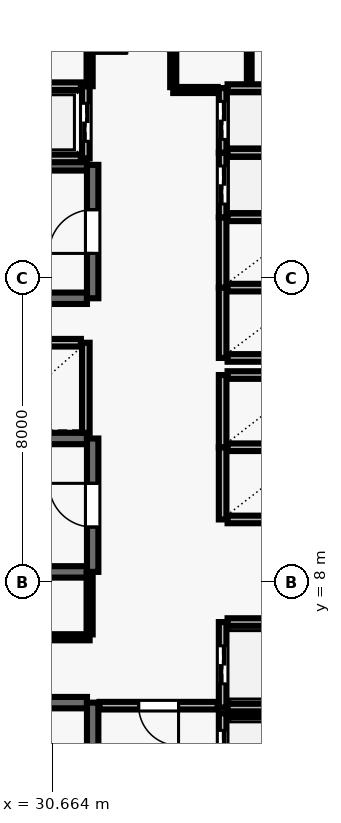
"""IFC4 building model, lengths in metres.
Left out: names, types, materials, properties, quantities, classifications, styles, units other than length and angle.
Written with IfcOpenShell. Run it as: python <this file> out.ifc"""

import sys

from ifc_helpers import new_model, si_unit, direction, frame, frame_2d, origin, place, context, subcontext, project, spatial, rectangle, extrude, element, fill, save


model = new_model("IFC4")
c1 = context("Model", 3, precision=1e-05, world=origin(), true_north=direction((0.0, 1.0)))
c2 = subcontext(c1, "Body", "Model", "MODEL_VIEW")
j1 = project(units=[si_unit("LENGTHUNIT", "METRE"), si_unit("PLANEANGLEUNIT", "RADIAN")], contexts=[c1])
p1 = place(None, origin())
s1 = spatial("IfcSite", under=j1, at=p1, CompositionType="ELEMENT")
p2 = place(p1, origin())
s2 = spatial("IfcBuilding", under=s1, at=p2, CompositionType="ELEMENT")
p3 = place(p2, frame((0.0, 0.0, 161.9)))
s3 = spatial("IfcBuildingStorey", under=s2, at=p3, CompositionType="ELEMENT", Elevation=161.9)
p4 = place(p3, frame((31.58, 4.83, 0.0), z_axis=(0.0, 0.0, 1.0), x_axis=(-1.0, 0.0, 0.0)))
e1 = element("IfcWall", 1, at=p4, inside=s3, PredefinedType="SHEAR", context=c2, shape_type="SweptSolid", body=[
    extrude(rectangle(XDim=8.36, YDim=0.3, at=frame_2d((4.18, 0.0))), origin(), (0.0, 0.0, 1.0), 3.64),
])
p5 = place(p3, frame((31.73, 0.96, 0.0), z_axis=(0.0, 0.0, 1.0), x_axis=(0.0, 1.0, 0.0)))
e2 = element("IfcWall", 2, at=p5, inside=s3, PredefinedType="SHEAR", context=c2, shape_type="SweptSolid", body=[
    extrude(rectangle(XDim=3.87, YDim=0.3, at=frame_2d((1.935, 0.0))), origin(), (0.0, 0.0, 1.0), 3.64),
])
p6 = place(p5, frame((1.54, 0.0, 0.0)))
e3 = element("IfcOpeningElement", 3, at=p6, cuts=e2, PredefinedType="OPENING", context=c2, shape_type="SweptSolid", body=[
    extrude(rectangle(XDim=1.15, YDim=2.15, at=frame_2d((0.575, 1.075))), frame((0.0, 0.16, 0.0), z_axis=(0.0, -1.0, 0.0), x_axis=(1.0, 0.0, 0.0)), (0.0, 0.0, 1.0), 0.32),
])
for number, where, z_axis, x_axis in (
    (4, (31.58, 18.98, 0.0), (0.0, 0.0, 1.0), (-1.0, 0.0, 0.0)),
    (5, (23.22, 15.47, 0.0), (0.0, 0.0, 1.0), (1.0, 0.0, 0.0)),
):
    element("IfcWall", number, at=place(p3, frame(where, z_axis=z_axis, x_axis=x_axis)), inside=s3, PredefinedType="SHEAR", context=c2, shape_type="SweptSolid", body=[
        extrude(rectangle(XDim=8.36, YDim=0.3, at=frame_2d((4.18, 0.0))), origin(), (0.0, 0.0, 1.0), 3.64),
    ])
p7 = place(p3, frame((31.73, 15.47, 0.0), z_axis=(0.0, 0.0, 1.0), x_axis=(0.0, 1.0, 0.0)))
e6 = element("IfcWall", 6, at=p7, inside=s3, PredefinedType="SHEAR", context=c2, shape_type="SweptSolid", body=[
    extrude(rectangle(XDim=3.51, YDim=0.3, at=frame_2d((1.755, 0.0))), origin(), (0.0, 0.0, 1.0), 3.64),
])
p8 = place(p7, frame((1.18, 0.0, 0.0)))
e7 = element("IfcOpeningElement", 7, at=p8, cuts=e6, PredefinedType="OPENING", context=c2, shape_type="SweptSolid", body=[
    extrude(rectangle(XDim=1.15, YDim=2.15, at=frame_2d((0.575, 1.075))), frame((0.0, 0.16, 0.0), z_axis=(0.0, -1.0, 0.0), x_axis=(1.0, 0.0, 0.0)), (0.0, 0.0, 1.0), 0.32),
])
for number, where, z_axis, x_axis in (
    (8, (31.58, 11.78, 0.0), (0.0, 0.0, 1.0), (-1.0, 0.0, 0.0)),
    (9, (23.22, 8.27, 0.0), (0.0, 0.0, 1.0), (1.0, 0.0, 0.0)),
):
    element("IfcWall", number, at=place(p3, frame(where, z_axis=z_axis, x_axis=x_axis)), inside=s3, PredefinedType="SHEAR", context=c2, shape_type="SweptSolid", body=[
        extrude(rectangle(XDim=8.36, YDim=0.3, at=frame_2d((4.18, 0.0))), origin(), (0.0, 0.0, 1.0), 3.64),
    ])
p9 = place(p3, frame((31.73, 8.27, 0.0), z_axis=(0.0, 0.0, 1.0), x_axis=(0.0, 1.0, 0.0)))
e10 = element("IfcWall", 10, at=p9, inside=s3, PredefinedType="SHEAR", context=c2, shape_type="SweptSolid", body=[
    extrude(rectangle(XDim=3.51, YDim=0.3, at=frame_2d((1.755, 0.0))), origin(), (0.0, 0.0, 1.0), 3.64),
])
p10 = place(p9, frame((1.18, 0.0, 0.0)))
e11 = element("IfcOpeningElement", 11, at=p10, cuts=e10, PredefinedType="OPENING", context=c2, shape_type="SweptSolid", body=[
    extrude(rectangle(XDim=1.15, YDim=2.15, at=frame_2d((0.575, 1.075))), frame((0.0, 0.16, 0.0), z_axis=(0.0, -1.0, 0.0), x_axis=(1.0, 0.0, 0.0)), (0.0, 0.0, 1.0), 0.32),
])
p11 = place(p3, frame((35.15, 4.55, 0.0), z_axis=(0.0, 0.0, 1.0), x_axis=(0.0, -1.0, 0.0)))
e12 = element("IfcWall", 12, at=p11, inside=s3, PredefinedType="SOLIDWALL", context=c2, shape_type="SweptSolid", body=[
    extrude(rectangle(XDim=2.1, YDim=0.2, at=frame_2d((1.05, 0.0))), origin(), (0.0, 0.0, 1.0), 3.64),
])
p12 = place(p11, frame((0.45, 0.0, 0.0)))
e13 = element("IfcOpeningElement", 13, at=p12, cuts=e12, PredefinedType="OPENING", context=c2, shape_type="SweptSolid", body=[
    extrude(rectangle(XDim=1.2, YDim=2.15, at=frame_2d((0.6, 1.075))), frame((0.0, 0.11, 0.0), z_axis=(0.0, -1.0, 0.0), x_axis=(1.0, 0.0, 0.0)), (0.0, 0.0, 1.0), 0.22),
])
p13 = place(p3, frame((37.42, 4.55, 0.0), z_axis=(0.0, 0.0, 1.0), x_axis=(-1.0, 0.0, 0.0)))
e14 = element("IfcWall", 14, at=p13, inside=s3, PredefinedType="SOLIDWALL", context=c2, shape_type="SweptSolid", body=[
    extrude(rectangle(XDim=2.14, YDim=0.2, at=frame_2d((1.07, 0.0))), origin(), (0.0, 0.0, 1.0), 3.64),
])
p14 = place(p3, frame((35.15, 6.95, 0.0), z_axis=(0.0, 0.0, 1.0), x_axis=(0.0, -1.0, 0.0)))
e15 = element("IfcWall", 15, at=p14, inside=s3, PredefinedType="SOLIDWALL", context=c2, shape_type="SweptSolid", body=[
    extrude(rectangle(XDim=2.25, YDim=0.2, at=frame_2d((1.125, 0.0))), origin(), (0.0, 0.0, 1.0), 3.64),
])
p15 = place(p14, frame((0.625, 0.0, 0.0)))
e16 = element("IfcOpeningElement", 16, at=p15, cuts=e15, PredefinedType="OPENING", context=c2, shape_type="SweptSolid", body=[
    extrude(rectangle(XDim=1.0, YDim=2.1, at=frame_2d((0.5, 1.05))), frame((0.0, 0.11, 0.0), z_axis=(0.0, -1.0, 0.0), x_axis=(1.0, 0.0, 0.0)), (0.0, 0.0, 1.0), 0.22),
])
for number, where, z_axis, x_axis in (
    (17, (35.28, 4.7, 0.0), (0.0, 0.0, 1.0), (1.0, 0.0, 0.0)),
    (18, (37.42, 6.95, 0.0), (0.0, 0.0, 1.0), (-1.0, 0.0, 0.0)),
):
    element("IfcWall", number, at=place(p3, frame(where, z_axis=z_axis, x_axis=x_axis)), inside=s3, PredefinedType="SOLIDWALL", context=c2, shape_type="SweptSolid", body=[
        extrude(rectangle(XDim=2.14, YDim=0.2, at=frame_2d((1.07, 0.0))), origin(), (0.0, 0.0, 1.0), 3.64),
    ])
p16 = place(p3, frame((35.15, 11.55, 0.0), z_axis=(0.0, 0.0, 1.0), x_axis=(0.0, -1.0, 0.0)))
e19 = element("IfcWall", 19, at=p16, inside=s3, PredefinedType="SOLIDWALL", context=c2, shape_type="SweptSolid", body=[
    extrude(rectangle(XDim=1.9, YDim=0.2, at=frame_2d((0.95, 0.0))), origin(), (0.0, 0.0, 1.0), 3.64),
])
for number, where, z_axis, x_axis in (
    (20, (35.28, 9.65, 0.0), (0.0, 0.0, 1.0), (1.0, 0.0, 0.0)),
    (21, (37.42, 11.55, 0.0), (0.0, 0.0, 1.0), (-1.0, 0.0, 0.0)),
):
    element("IfcWall", number, at=place(p3, frame(where, z_axis=z_axis, x_axis=x_axis)), inside=s3, PredefinedType="SOLIDWALL", context=c2, shape_type="SweptSolid", body=[
        extrude(rectangle(XDim=2.14, YDim=0.2, at=frame_2d((1.07, 0.0))), origin(), (0.0, 0.0, 1.0), 3.64),
    ])
p17 = place(p3, frame((35.15, 13.45, 0.0), z_axis=(0.0, 0.0, 1.0), x_axis=(0.0, -1.0, 0.0)))
e22 = element("IfcWall", 22, at=p17, inside=s3, PredefinedType="SOLIDWALL", context=c2, shape_type="SweptSolid", body=[
    extrude(rectangle(XDim=1.9, YDim=0.2, at=frame_2d((0.95, 0.0))), origin(), (0.0, 0.0, 1.0), 3.64),
])
p18 = place(p3, frame((37.42, 13.45, 0.0), z_axis=(0.0, 0.0, 1.0), x_axis=(-1.0, 0.0, 0.0)))
e23 = element("IfcWall", 23, at=p18, inside=s3, PredefinedType="SOLIDWALL", context=c2, shape_type="SweptSolid", body=[
    extrude(rectangle(XDim=2.14, YDim=0.2, at=frame_2d((1.07, 0.0))), origin(), (0.0, 0.0, 1.0), 3.64),
])
p19 = place(p3, frame((31.55, 11.93, 0.0), z_axis=(0.0, 0.0, 1.0), x_axis=(0.0, 1.0, 0.0)))
e24 = element("IfcWall", 24, at=p19, inside=s3, PredefinedType="SOLIDWALL", context=c2, shape_type="SweptSolid", body=[
    extrude(rectangle(XDim=2.37, YDim=0.2, at=frame_2d((1.185, 0.0))), origin(), (0.0, 0.0, 1.0), 3.64),
])
p20 = place(p3, frame((31.42, 14.3, 0.0), z_axis=(0.0, 0.0, 1.0), x_axis=(-1.0, 0.0, 0.0)))
e25 = element("IfcWall", 25, at=p20, inside=s3, PredefinedType="SOLIDWALL", context=c2, shape_type="SweptSolid", body=[
    extrude(rectangle(XDim=2.44, YDim=0.2, at=frame_2d((1.22, 0.0))), origin(), (0.0, 0.0, 1.0), 3.64),
])
p21 = place(p3, frame((35.15, 15.75, 0.0), z_axis=(0.0, 0.0, 1.0), x_axis=(0.0, -1.0, 0.0)))
e26 = element("IfcWall", 26, at=p21, inside=s3, PredefinedType="SOLIDWALL", context=c2, shape_type="SweptSolid", body=[
    extrude(rectangle(XDim=1.85, YDim=0.2, at=frame_2d((0.925, 0.0))), origin(), (0.0, 0.0, 1.0), 3.64),
])
for number, where, z_axis, x_axis in (
    (27, (35.28, 13.9, 0.0), (0.0, 0.0, 1.0), (1.0, 0.0, 0.0)),
    (28, (37.42, 15.75, 0.0), (0.0, 0.0, 1.0), (-1.0, 0.0, 0.0)),
):
    element("IfcWall", number, at=place(p3, frame(where, z_axis=z_axis, x_axis=x_axis)), inside=s3, PredefinedType="SOLIDWALL", context=c2, shape_type="SweptSolid", body=[
        extrude(rectangle(XDim=2.14, YDim=0.2, at=frame_2d((1.07, 0.0))), origin(), (0.0, 0.0, 1.0), 3.64),
    ])
p22 = place(p3, frame((35.15, 17.6, 0.0), z_axis=(0.0, 0.0, 1.0), x_axis=(0.0, -1.0, 0.0)))
e29 = element("IfcWall", 29, at=p22, inside=s3, PredefinedType="SOLIDWALL", context=c2, shape_type="SweptSolid", body=[
    extrude(rectangle(XDim=1.85, YDim=0.2, at=frame_2d((0.925, 0.0))), origin(), (0.0, 0.0, 1.0), 3.64),
])
p23 = place(p3, frame((37.42, 17.6, 0.0), z_axis=(0.0, 0.0, 1.0), x_axis=(-1.0, 0.0, 0.0)))
e30 = element("IfcWall", 30, at=p23, inside=s3, PredefinedType="SOLIDWALL", context=c2, shape_type="SweptSolid", body=[
    extrude(rectangle(XDim=2.14, YDim=0.2, at=frame_2d((1.07, 0.0))), origin(), (0.0, 0.0, 1.0), 3.64),
])
p24 = place(p3, frame((35.15, 19.3, 0.0), z_axis=(0.0, 0.0, 1.0), x_axis=(0.0, -1.0, 0.0)))
e31 = element("IfcWall", 31, at=p24, inside=s3, PredefinedType="SOLIDWALL", context=c2, shape_type="SweptSolid", body=[
    extrude(rectangle(XDim=1.7, YDim=0.2, at=frame_2d((0.85, 0.0))), origin(), (0.0, 0.0, 1.0), 3.64),
])
p25 = place(p24, frame((0.35, 0.0, 0.0)))
e32 = element("IfcOpeningElement", 32, at=p25, cuts=e31, PredefinedType="OPENING", context=c2, shape_type="SweptSolid", body=[
    extrude(rectangle(XDim=1.0, YDim=2.1, at=frame_2d((0.5, 1.05))), frame((0.0, 0.11, 0.0), z_axis=(0.0, -1.0, 0.0), x_axis=(1.0, 0.0, 0.0)), (0.0, 0.0, 1.0), 0.22),
])
p26 = place(p3, frame((37.42, 19.3, 0.0), z_axis=(0.0, 0.0, 1.0), x_axis=(-1.0, 0.0, 0.0)))
e33 = element("IfcWall", 33, at=p26, inside=s3, PredefinedType="SOLIDWALL", context=c2, shape_type="SweptSolid", body=[
    extrude(rectangle(XDim=2.14, YDim=0.2, at=frame_2d((1.07, 0.0))), origin(), (0.0, 0.0, 1.0), 3.64),
])
p27 = place(p3, frame((35.15, 21.0, 0.0), z_axis=(0.0, 0.0, 1.0), x_axis=(0.0, -1.0, 0.0)))
e34 = element("IfcWall", 34, at=p27, inside=s3, PredefinedType="SOLIDWALL", context=c2, shape_type="SweptSolid", body=[
    extrude(rectangle(XDim=1.7, YDim=0.2, at=frame_2d((0.85, 0.0))), origin(), (0.0, 0.0, 1.0), 3.64),
])
p28 = place(p27, frame((0.35, 0.0, 0.0)))
e35 = element("IfcOpeningElement", 35, at=p28, cuts=e34, PredefinedType="OPENING", context=c2, shape_type="SweptSolid", body=[
    extrude(rectangle(XDim=1.0, YDim=2.1, at=frame_2d((0.5, 1.05))), frame((0.0, 0.11, 0.0), z_axis=(0.0, -1.0, 0.0), x_axis=(1.0, 0.0, 0.0)), (0.0, 0.0, 1.0), 0.22),
])
p29 = place(p3, frame((37.42, 21.0, 0.0), z_axis=(0.0, 0.0, 1.0), x_axis=(-1.0, 0.0, 0.0)))
e36 = element("IfcWall", 36, at=p29, inside=s3, PredefinedType="SOLIDWALL", context=c2, shape_type="SweptSolid", body=[
    extrude(rectangle(XDim=2.14, YDim=0.2, at=frame_2d((1.07, 0.0))), origin(), (0.0, 0.0, 1.0), 3.64),
])
p30 = place(p3, frame((31.55, 19.15, 0.0), z_axis=(0.0, 0.0, 1.0), x_axis=(0.0, 1.0, 0.0)))
e37 = element("IfcWall", 37, at=p30, inside=s3, PredefinedType="SOLIDWALL", context=c2, shape_type="SweptSolid", body=[
    extrude(rectangle(XDim=1.9, YDim=0.2, at=frame_2d((0.95, 0.0))), origin(), (0.0, 0.0, 1.0), 3.64),
])
p31 = place(p30, frame((0.45, 0.0, 0.0)))
e38 = element("IfcOpeningElement", 38, at=p31, cuts=e37, PredefinedType="OPENING", context=c2, shape_type="SweptSolid", body=[
    extrude(rectangle(XDim=1.0, YDim=2.1, at=frame_2d((0.5, 1.05))), frame((0.0, 0.11, 0.0), z_axis=(0.0, -1.0, 0.0), x_axis=(1.0, 0.0, 0.0)), (0.0, 0.0, 1.0), 0.22),
])
for number, where, z_axis, x_axis in (
    (39, (28.98, 19.15, 0.0), (0.0, 0.0, 1.0), (1.0, 0.0, 0.0)),
    (40, (31.42, 21.05, 0.0), (0.0, 0.0, 1.0), (-1.0, 0.0, 0.0)),
):
    element("IfcWall", number, at=place(p3, frame(where, z_axis=z_axis, x_axis=x_axis)), inside=s3, PredefinedType="SOLIDWALL", context=c2, shape_type="SweptSolid", body=[
        extrude(rectangle(XDim=2.44, YDim=0.2, at=frame_2d((1.22, 0.0))), origin(), (0.0, 0.0, 1.0), 3.64),
    ])
p32 = place(p3, frame((31.65, 6.55, 0.0), z_axis=(0.0, 0.0, 1.0), x_axis=(-1.0, 0.0, 0.0)))
e41 = element("IfcWall", 41, at=p32, inside=s3, PredefinedType="PARTITIONING", context=c2, shape_type="SweptSolid", body=[
    extrude(rectangle(XDim=4.75, YDim=0.16, at=frame_2d((2.375, 0.0))), origin(), (0.0, 0.0, 1.0), 3.64),
])
p33 = place(p32, frame((1.935, 0.0, 0.0)))
e42 = element("IfcOpeningElement", 42, at=p33, cuts=e41, PredefinedType="OPENING", context=c2, shape_type="SweptSolid", body=[
    extrude(rectangle(XDim=0.88, YDim=2.1, at=frame_2d((0.44, 1.05))), frame((0.0, 0.09, 0.0), z_axis=(0.0, -1.0, 0.0), x_axis=(1.0, 0.0, 0.0)), (0.0, 0.0, 1.0), 0.18),
])
p34 = place(p3, frame((35.02, 4.75, 0.0), z_axis=(0.0, 0.0, 1.0), x_axis=(-1.0, 0.0, 0.0)))
e43 = element("IfcWall", 43, at=p34, inside=s3, PredefinedType="SOLIDWALL", context=c2, shape_type="SweptSolid", body=[
    extrude(rectangle(XDim=3.11, YDim=0.2, at=frame_2d((1.555, 0.0))), origin(), (0.0, 0.0, 1.0), 3.64),
])
p35 = place(p34, frame((1.03, 0.0, 0.0)))
e44 = element("IfcOpeningElement", 44, at=p35, cuts=e43, PredefinedType="OPENING", context=c2, shape_type="SweptSolid", body=[
    extrude(rectangle(XDim=1.05, YDim=2.15, at=frame_2d((0.525, 1.075))), frame((0.0, 0.11, 0.0), z_axis=(0.0, -1.0, 0.0), x_axis=(1.0, 0.0, 0.0)), (0.0, 0.0, 1.0), 0.22),
])
p36 = place(p3, frame((35.02, 20.95, 0.0), z_axis=(0.0, 0.0, 1.0), x_axis=(-1.0, 0.0, 0.0)))
e45 = element("IfcWall", 45, at=p36, inside=s3, PredefinedType="PARTITIONING", context=c2, shape_type="SweptSolid", body=[
    extrude(rectangle(XDim=1.17, YDim=0.16, at=frame_2d((0.585, 0.0))), origin(), (0.0, 0.0, 1.0), 3.64),
])
p37 = place(p3, frame((31.65, 8.24, 0.0), z_axis=(0.0, 0.0, 1.0), x_axis=(0.0, -1.0, 0.0)))
e46 = element("IfcWall", 46, at=p37, inside=s3, PredefinedType="PARTITIONING", context=c2, shape_type="SweptSolid", body=[
    extrude(rectangle(XDim=1.615, YDim=0.16, at=frame_2d((0.808, 0.0))), origin(), (0.0, 0.0, 1.0), 3.64),
])
p38 = place(p3, frame((31.65, 23.775, 0.0), z_axis=(0.0, 0.0, 1.0), x_axis=(0.0, -1.0, 0.0)))
e47 = element("IfcWall", 47, at=p38, inside=s3, PredefinedType="PARTITIONING", context=c2, shape_type="SweptSolid", body=[
    extrude(rectangle(XDim=2.725, YDim=0.16, at=frame_2d((1.362, 0.0))), origin(), (0.0, 0.0, 1.0), 3.64),
])
p39 = place(p38, frame((0.862, 0.0, 0.0)))
e48 = element("IfcOpeningElement", 48, at=p39, cuts=e47, PredefinedType="OPENING", context=c2, shape_type="SweptSolid", body=[
    extrude(rectangle(XDim=1.0, YDim=2.1, at=frame_2d((0.5, 1.05))), frame((0.0, 0.09, 0.0), z_axis=(0.0, -1.0, 0.0), x_axis=(1.0, 0.0, 0.0)), (0.0, 0.0, 1.0), 0.18),
])
p40 = place(p3, frame((33.85, 21.025, 0.0), z_axis=(0.0, 0.0, 1.0), x_axis=(0.0, 1.0, 0.0)))
e49 = element("IfcWall", 49, at=p40, inside=s3, PredefinedType="PARTITIONING", context=c2, shape_type="SweptSolid", body=[
    extrude(rectangle(XDim=2.75, YDim=0.16, at=frame_2d((1.375, 0.0))), origin(), (0.0, 0.0, 1.0), 3.64),
])
p41 = place(p40, frame((0.925, 0.0, 0.0)))
e50 = element("IfcOpeningElement", 50, at=p41, cuts=e49, PredefinedType="OPENING", context=c2, shape_type="SweptSolid", body=[
    extrude(rectangle(XDim=0.9, YDim=2.1, at=frame_2d((0.45, 1.05))), frame((0.0, 0.09, 0.0), z_axis=(0.0, -1.0, 0.0), x_axis=(1.0, 0.0, 0.0)), (0.0, 0.0, 1.0), 0.18),
])
p42 = place(p3, frame((35.85, 21.13, 0.0), z_axis=(0.0, 0.0, 1.0), x_axis=(0.0, 1.0, 0.0)))
e51 = element("IfcWall", 51, at=p42, inside=s3, PredefinedType="PARTITIONING", context=c2, shape_type="SweptSolid", body=[
    extrude(rectangle(XDim=2.645, YDim=0.125, at=frame_2d((1.323, 0.0))), origin(), (0.0, 0.0, 1.0), 3.64),
])
p43 = place(p42, frame((0.872, 0.0, 0.0)))
e52 = element("IfcOpeningElement", 52, at=p43, cuts=e51, PredefinedType="OPENING", context=c2, shape_type="SweptSolid", body=[
    extrude(rectangle(XDim=0.9, YDim=2.1, at=frame_2d((0.45, 1.05))), frame((0.0, 0.073, 0.0), z_axis=(0.0, -1.0, 0.0), x_axis=(1.0, 0.0, 0.0)), (0.0, 0.0, 1.0), 0.145),
])
p44 = place(p8, origin())
e53 = element("IfcDoor", 53, at=p44, inside=s3, OperationType="SINGLE_SWING_LEFT", PredefinedType="DOOR", context=c2, shape_type="SweptSolid", body=[
    extrude(rectangle(XDim=1.15, YDim=2.15, at=frame_2d((0.575, 1.075))), frame((0.0, 0.025, 0.0), z_axis=(0.0, -1.0, 0.0), x_axis=(1.0, 0.0, 0.0)), (0.0, 0.0, 1.0), 0.05),
])
fill(e7, e53)
p45 = place(p10, origin())
e54 = element("IfcDoor", 54, at=p45, inside=s3, OperationType="SINGLE_SWING_RIGHT", PredefinedType="DOOR", context=c2, shape_type="SweptSolid", body=[
    extrude(rectangle(XDim=1.15, YDim=2.15, at=frame_2d((0.575, 1.075))), frame((0.0, 0.025, 0.0), z_axis=(0.0, -1.0, 0.0), x_axis=(1.0, 0.0, 0.0)), (0.0, 0.0, 1.0), 0.05),
])
fill(e11, e54)
p46 = place(p12, origin())
e55 = element("IfcDoor", 55, at=p46, inside=s3, OperationType="DOUBLE_DOOR_SLIDING", PredefinedType="DOOR", context=c2, shape_type="SweptSolid", body=[
    extrude(rectangle(XDim=1.2, YDim=2.15, at=frame_2d((0.6, 1.075))), frame((0.0, 0.025, 0.0), z_axis=(0.0, -1.0, 0.0), x_axis=(1.0, 0.0, 0.0)), (0.0, 0.0, 1.0), 0.05),
])
fill(e13, e55)
p47 = place(p15, origin())
e56 = element("IfcDoor", 56, at=p47, inside=s3, OperationType="DOUBLE_DOOR_SLIDING", PredefinedType="DOOR", context=c2, shape_type="SweptSolid", body=[
    extrude(rectangle(XDim=1.0, YDim=2.1, at=frame_2d((0.5, 1.05))), frame((0.0, 0.025, 0.0), z_axis=(0.0, -1.0, 0.0), x_axis=(1.0, 0.0, 0.0)), (0.0, 0.0, 1.0), 0.05),
])
fill(e16, e56)
p48 = place(p25, origin())
e57 = element("IfcDoor", 57, at=p48, inside=s3, OperationType="DOUBLE_DOOR_SLIDING", PredefinedType="DOOR", context=c2, shape_type="SweptSolid", body=[
    extrude(rectangle(XDim=1.0, YDim=2.1, at=frame_2d((0.5, 1.05))), frame((0.0, 0.025, 0.0), z_axis=(0.0, -1.0, 0.0), x_axis=(1.0, 0.0, 0.0)), (0.0, 0.0, 1.0), 0.05),
])
fill(e32, e57)
p49 = place(p28, origin())
e58 = element("IfcDoor", 58, at=p49, inside=s3, OperationType="DOUBLE_DOOR_SLIDING", PredefinedType="DOOR", context=c2, shape_type="SweptSolid", body=[
    extrude(rectangle(XDim=1.0, YDim=2.1, at=frame_2d((0.5, 1.05))), frame((0.0, 0.025, 0.0), z_axis=(0.0, -1.0, 0.0), x_axis=(1.0, 0.0, 0.0)), (0.0, 0.0, 1.0), 0.05),
])
fill(e35, e58)
p50 = place(p31, origin())
e59 = element("IfcDoor", 59, at=p50, inside=s3, OperationType="DOUBLE_DOOR_SLIDING", PredefinedType="DOOR", context=c2, shape_type="SweptSolid", body=[
    extrude(rectangle(XDim=1.0, YDim=2.1, at=frame_2d((0.5, 1.05))), frame((0.0, 0.025, 0.0), z_axis=(0.0, -1.0, 0.0), x_axis=(1.0, 0.0, 0.0)), (0.0, 0.0, 1.0), 0.05),
])
fill(e38, e59)
p51 = place(p35, origin())
e60 = element("IfcDoor", 60, at=p51, inside=s3, OperationType="SINGLE_SWING_LEFT", PredefinedType="DOOR", context=c2, shape_type="SweptSolid", body=[
    extrude(rectangle(XDim=1.05, YDim=2.15, at=frame_2d((0.525, 1.075))), frame((0.0, 0.025, 0.0), z_axis=(0.0, -1.0, 0.0), x_axis=(1.0, 0.0, 0.0)), (0.0, 0.0, 1.0), 0.05),
])
fill(e44, e60)
p52 = place(p39, origin())
e61 = element("IfcDoor", 61, at=p52, inside=s3, OperationType="SINGLE_SWING_RIGHT", PredefinedType="DOOR", context=c2, shape_type="SweptSolid", body=[
    extrude(rectangle(XDim=1.0, YDim=2.1, at=frame_2d((0.5, 1.05))), frame((0.0, 0.025, 0.0), z_axis=(0.0, -1.0, 0.0), x_axis=(1.0, 0.0, 0.0)), (0.0, 0.0, 1.0), 0.05),
])
fill(e48, e61)
save(model, sys.argv[1])
